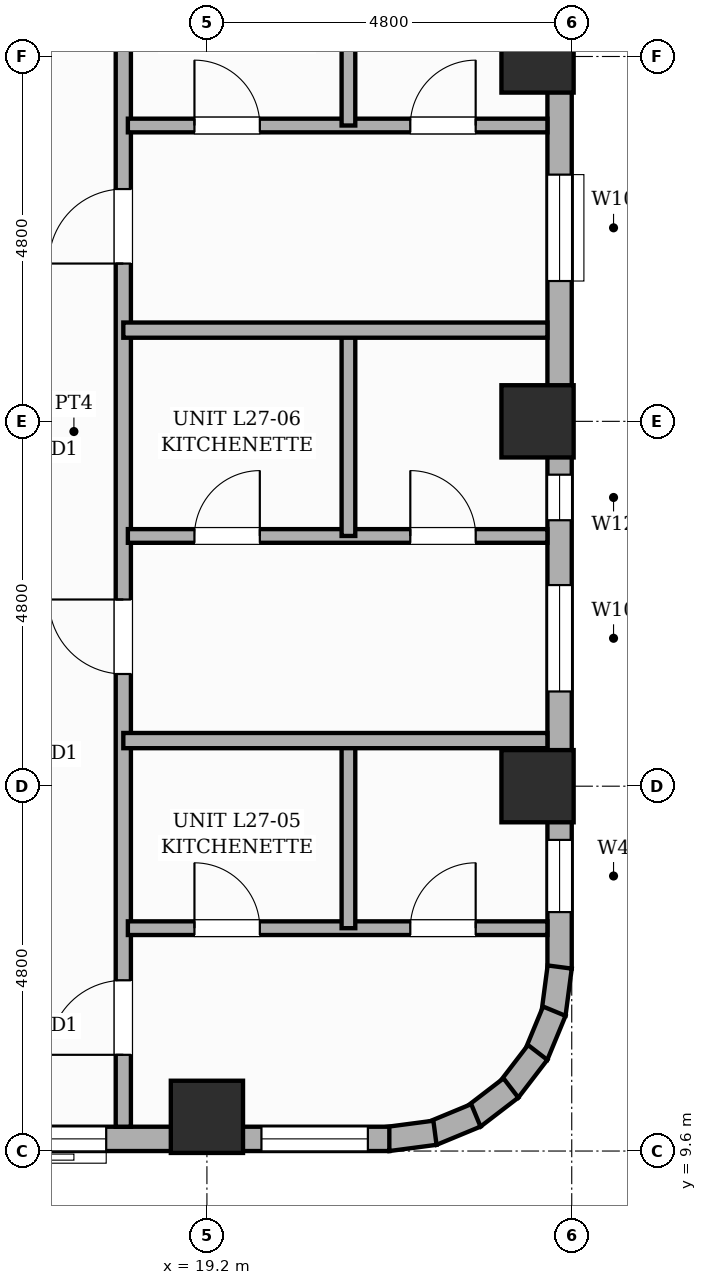
"""IFC4 building model, lengths in metres.
Left out: names, types, materials, properties, quantities, classifications, styles, units other than length and angle.
Written with IfcOpenShell. Run it as: python <this file> out.ifc"""

import sys

from ifc_helpers import new_model, si_unit, direction, frame, frame_2d, origin, origin_2d, place, context, subcontext, project, spatial, rectangle, extrude, element, fill, save


model = new_model("IFC4")
c1 = context("Model", 3, precision=1e-05, world=origin(), true_north=direction((0.0, 1.0)))
c2 = subcontext(c1, "Body", "Model", "MODEL_VIEW")
j1 = project(units=[si_unit("LENGTHUNIT", "METRE"), si_unit("PLANEANGLEUNIT", "RADIAN")], contexts=[c1])
p1 = place(None, origin())
s1 = spatial("IfcSite", under=j1, at=p1, CompositionType="ELEMENT")
p2 = place(p1, origin())
s2 = spatial("IfcBuilding", under=s1, at=p2, CompositionType="ELEMENT")
p3 = place(p2, frame((0.0, 0.0, 107.2)))
s3 = spatial("IfcBuildingStorey", under=s2, at=p3, CompositionType="ELEMENT", Elevation=107.2)
for number, where, z_axis, x_axis in (
    (1, (19.2, 10.05, 0.0), (0.0, 0.0, 1.0), (1.0, 0.0, 0.0)),
    (2, (23.55, 14.4, 0.0), (0.0, 0.0, 1.0), (1.0, 0.0, 0.0)),
    (3, (23.55, 19.2, 0.0), (0.0, 0.0, 1.0), (1.0, 0.0, 0.0)),
    (4, (23.55, 24.0, 0.0), (0.0, 0.0, 1.0), (1.0, 0.0, 0.0)),
):
    element("IfcColumn", number, at=place(p3, frame(where, z_axis=z_axis, x_axis=x_axis)), inside=s3, PredefinedType="COLUMN", context=c2, shape_type="SweptSolid", body=[
        extrude(rectangle(XDim=0.95, YDim=0.95, at=origin_2d()), origin(), (0.0, 0.0, 1.0), 3.6),
    ])
p4 = place(p3, frame((23.84, 26.4, 0.0), z_axis=(0.0, 0.0, 1.0), x_axis=(0.0, -1.0, 0.0)))
e5 = element("IfcWall", 5, at=p4, inside=s3, PredefinedType="STANDARD", context=c2, shape_type="SweptSolid", body=[
    extrude(rectangle(XDim=14.4, YDim=0.32, at=frame_2d((7.2, 0.0))), origin(), (0.0, 0.0, 1.0), 2.54),
])
p5 = place(p4, frame((9.354, 0.0, 0.65)))
e6 = element("IfcOpeningElement", 6, at=p5, cuts=e5, PredefinedType="OPENING", context=c2, shape_type="SweptSolid", body=[
    extrude(rectangle(XDim=1.4, YDim=1.1, at=frame_2d((0.7, 0.55))), frame((0.0, 0.17, 0.0), z_axis=(0.0, -1.0, 0.0), x_axis=(1.0, 0.0, 0.0)), (0.0, 0.0, 1.0), 0.34),
])
p6 = place(p4, frame((3.954, 0.0, 0.65)))
e7 = element("IfcOpeningElement", 7, at=p6, cuts=e5, PredefinedType="OPENING", context=c2, shape_type="SweptSolid", body=[
    extrude(rectangle(XDim=1.4, YDim=1.1, at=frame_2d((0.7, 0.55))), frame((0.0, 0.17, 0.0), z_axis=(0.0, -1.0, 0.0), x_axis=(1.0, 0.0, 0.0)), (0.0, 0.0, 1.0), 0.34),
])
p7 = place(p4, frame((12.707, 0.0, 0.45)))
e8 = element("IfcOpeningElement", 8, at=p7, cuts=e5, PredefinedType="OPENING", context=c2, shape_type="SweptSolid", body=[
    extrude(rectangle(XDim=0.95, YDim=1.8, at=frame_2d((0.475, 0.9))), frame((0.0, 0.17, 0.0), z_axis=(0.0, -1.0, 0.0), x_axis=(1.0, 0.0, 0.0)), (0.0, 0.0, 1.0), 0.34),
])
p8 = place(p4, frame((7.902, 0.0, 0.45)))
e9 = element("IfcOpeningElement", 9, at=p8, cuts=e5, PredefinedType="OPENING", context=c2, shape_type="SweptSolid", body=[
    extrude(rectangle(XDim=0.6, YDim=1.8, at=frame_2d((0.3, 0.9))), frame((0.0, 0.17, 0.0), z_axis=(0.0, -1.0, 0.0), x_axis=(1.0, 0.0, 0.0)), (0.0, 0.0, 1.0), 0.34),
])
p9 = place(p4, frame((0.917, 0.0, 0.45)))
e10 = element("IfcOpeningElement", 10, at=p9, cuts=e5, PredefinedType="OPENING", context=c2, shape_type="SweptSolid", body=[
    extrude(rectangle(XDim=0.75, YDim=1.8, at=frame_2d((0.375, 0.9))), frame((0.0, 0.17, 0.0), z_axis=(0.0, -1.0, 0.0), x_axis=(1.0, 0.0, 0.0)), (0.0, 0.0, 1.0), 0.34),
])
p10 = place(p3, frame((23.841, 12.021, 0.0), z_axis=(0.0, 0.0, 1.0), x_axis=(-0.130504898859, -0.991447664465, 0.0)))
e11 = element("IfcWall", 11, at=p10, inside=s3, PredefinedType="STANDARD", context=c2, shape_type="SweptSolid", body=[
    extrude(rectangle(XDim=0.627, YDim=0.32, at=frame_2d((0.313, 0.0))), origin(), (0.0, 0.0, 1.0), 3.36),
])
for number, where, z_axis, x_axis in (
    (12, (23.771, 11.44, 0.0), (0.0, 0.0, 1.0), (-0.383, -0.924, 0.0)),
    (13, (23.552, 10.897, 0.0), (0.0, 0.0, 1.0), (-0.609, -0.793, 0.0)),
    (14, (23.2, 10.43, 0.0), (0.0, 0.0, 1.0), (-0.793, -0.609, 0.0)),
    (15, (22.739, 10.069, 0.0), (0.0, 0.0, 1.0), (-0.924, -0.383, 0.0)),
    (16, (22.2, 9.84, 0.0), (0.0, 0.0, 1.0), (-0.991, -0.131, 0.0)),
):
    element("IfcWall", number, at=place(p3, frame(where, z_axis=z_axis, x_axis=x_axis)), inside=s3, PredefinedType="STANDARD", context=c2, shape_type="SweptSolid", body=[
        extrude(rectangle(XDim=0.626, YDim=0.32, at=frame_2d((0.313, 0.0))), origin(), (0.0, 0.0, 1.0), 3.36),
    ])
p11 = place(p3, frame((21.6, 9.76, 0.0), z_axis=(0.0, 0.0, 1.0), x_axis=(-1.0, 0.0, 0.0)))
e17 = element("IfcWall", 17, at=p11, inside=s3, PredefinedType="STANDARD", context=c2, shape_type="SweptSolid", body=[
    extrude(rectangle(XDim=14.4, YDim=0.32, at=frame_2d((7.2, 0.0))), origin(), (0.0, 0.0, 1.0), 2.54),
])
p12 = place(p11, frame((5.653, 0.0, 0.45)))
e18 = element("IfcOpeningElement", 18, at=p12, cuts=e17, PredefinedType="OPENING", context=c2, shape_type="SweptSolid", body=[
    extrude(rectangle(XDim=0.75, YDim=1.8, at=frame_2d((0.375, 0.9))), frame((0.0, 0.17, 0.0), z_axis=(0.0, -1.0, 0.0), x_axis=(1.0, 0.0, 0.0)), (0.0, 0.0, 1.0), 0.34),
])
p13 = place(p11, frame((0.282, 0.0, 0.65)))
e19 = element("IfcOpeningElement", 19, at=p13, cuts=e17, PredefinedType="OPENING", context=c2, shape_type="SweptSolid", body=[
    extrude(rectangle(XDim=1.4, YDim=1.1, at=frame_2d((0.7, 0.55))), frame((0.0, 0.17, 0.0), z_axis=(0.0, -1.0, 0.0), x_axis=(1.0, 0.0, 0.0)), (0.0, 0.0, 1.0), 0.34),
])
p14 = place(p11, frame((3.725, 0.0, 0.65)))
e20 = element("IfcOpeningElement", 20, at=p14, cuts=e17, PredefinedType="OPENING", context=c2, shape_type="SweptSolid", body=[
    extrude(rectangle(XDim=1.4, YDim=1.1, at=frame_2d((0.7, 0.55))), frame((0.0, 0.17, 0.0), z_axis=(0.0, -1.0, 0.0), x_axis=(1.0, 0.0, 0.0)), (0.0, 0.0, 1.0), 0.34),
])
p15 = place(p3, frame((18.1, 9.92, 0.0), z_axis=(0.0, 0.0, 1.0), x_axis=(0.0, 1.0, 0.0)))
e21 = element("IfcWall", 21, at=p15, inside=s3, PredefinedType="PARTITIONING", context=c2, shape_type="SweptSolid", body=[
    extrude(rectangle(XDim=15.83, YDim=0.2, at=frame_2d((7.915, 0.0))), origin(), (0.0, 0.0, 1.0), 3.36),
])
p16 = place(p15, frame((0.946, 0.0, 0.0)))
e22 = element("IfcOpeningElement", 22, at=p16, cuts=e21, PredefinedType="OPENING", context=c2, shape_type="SweptSolid", body=[
    extrude(rectangle(XDim=0.98, YDim=2.18, at=frame_2d((0.49, 1.09))), frame((0.0, 0.11, 0.0), z_axis=(0.0, -1.0, 0.0), x_axis=(1.0, 0.0, 0.0)), (0.0, 0.0, 1.0), 0.22),
])
p17 = place(p15, frame((5.956, 0.0, 0.0)))
e23 = element("IfcOpeningElement", 23, at=p17, cuts=e21, PredefinedType="OPENING", context=c2, shape_type="SweptSolid", body=[
    extrude(rectangle(XDim=0.98, YDim=2.18, at=frame_2d((0.49, 1.09))), frame((0.0, 0.11, 0.0), z_axis=(0.0, -1.0, 0.0), x_axis=(1.0, 0.0, 0.0)), (0.0, 0.0, 1.0), 0.22),
])
p18 = place(p15, frame((11.356, 0.0, 0.0)))
e24 = element("IfcOpeningElement", 24, at=p18, cuts=e21, PredefinedType="OPENING", context=c2, shape_type="SweptSolid", body=[
    extrude(rectangle(XDim=0.98, YDim=2.18, at=frame_2d((0.49, 1.09))), frame((0.0, 0.11, 0.0), z_axis=(0.0, -1.0, 0.0), x_axis=(1.0, 0.0, 0.0)), (0.0, 0.0, 1.0), 0.22),
])
p19 = place(p3, frame((18.16, 12.532, 0.0), z_axis=(0.0, 0.0, 1.0), x_axis=(1.0, 0.0, 0.0)))
e25 = element("IfcWall", 25, at=p19, inside=s3, PredefinedType="PLUMBINGWALL", context=c2, shape_type="SweptSolid", body=[
    extrude(rectangle(XDim=5.52, YDim=0.18, at=frame_2d((2.76, 0.0))), origin(), (0.0, 0.0, 1.0), 3.36),
])
p20 = place(p19, frame((0.876, 0.0, 0.0)))
e26 = element("IfcOpeningElement", 26, at=p20, cuts=e25, PredefinedType="OPENING", context=c2, shape_type="SweptSolid", body=[
    extrude(rectangle(XDim=0.86, YDim=2.1, at=frame_2d((0.43, 1.05))), frame((0.0, 0.1, 0.0), z_axis=(0.0, -1.0, 0.0), x_axis=(1.0, 0.0, 0.0)), (0.0, 0.0, 1.0), 0.2),
])
p21 = place(p19, frame((3.716, 0.0, 0.0)))
e27 = element("IfcOpeningElement", 27, at=p21, cuts=e25, PredefinedType="OPENING", context=c2, shape_type="SweptSolid", body=[
    extrude(rectangle(XDim=0.86, YDim=2.1, at=frame_2d((0.43, 1.05))), frame((0.0, 0.1, 0.0), z_axis=(0.0, -1.0, 0.0), x_axis=(1.0, 0.0, 0.0)), (0.0, 0.0, 1.0), 0.2),
])
p22 = place(p3, frame((21.062, 12.532, 0.0), z_axis=(0.0, 0.0, 1.0), x_axis=(0.0, 1.0, 0.0)))
e28 = element("IfcWall", 28, at=p22, inside=s3, PredefinedType="PLUMBINGWALL", context=c2, shape_type="SweptSolid", body=[
    extrude(rectangle(XDim=2.508, YDim=0.18, at=frame_2d((1.254, 0.0))), origin(), (0.0, 0.0, 1.0), 3.36),
])
p23 = place(p3, frame((18.1, 15.0, 0.0), z_axis=(0.0, 0.0, 1.0), x_axis=(1.0, 0.0, 0.0)))
e29 = element("IfcWall", 29, at=p23, inside=s3, PredefinedType="SOLIDWALL", context=c2, shape_type="SweptSolid", body=[
    extrude(rectangle(XDim=5.58, YDim=0.2, at=frame_2d((2.79, 0.0))), origin(), (0.0, 0.0, 1.0), 3.36),
])
p24 = place(p3, frame((18.16, 17.692, 0.0), z_axis=(0.0, 0.0, 1.0), x_axis=(1.0, 0.0, 0.0)))
e30 = element("IfcWall", 30, at=p24, inside=s3, PredefinedType="PLUMBINGWALL", context=c2, shape_type="SweptSolid", body=[
    extrude(rectangle(XDim=5.52, YDim=0.18, at=frame_2d((2.76, 0.0))), origin(), (0.0, 0.0, 1.0), 3.36),
])
p25 = place(p24, frame((0.876, 0.0, 0.0)))
e31 = element("IfcOpeningElement", 31, at=p25, cuts=e30, PredefinedType="OPENING", context=c2, shape_type="SweptSolid", body=[
    extrude(rectangle(XDim=0.86, YDim=2.1, at=frame_2d((0.43, 1.05))), frame((0.0, 0.1, 0.0), z_axis=(0.0, -1.0, 0.0), x_axis=(1.0, 0.0, 0.0)), (0.0, 0.0, 1.0), 0.2),
])
p26 = place(p24, frame((3.716, 0.0, 0.0)))
e32 = element("IfcOpeningElement", 32, at=p26, cuts=e30, PredefinedType="OPENING", context=c2, shape_type="SweptSolid", body=[
    extrude(rectangle(XDim=0.86, YDim=2.1, at=frame_2d((0.43, 1.05))), frame((0.0, 0.1, 0.0), z_axis=(0.0, -1.0, 0.0), x_axis=(1.0, 0.0, 0.0)), (0.0, 0.0, 1.0), 0.2),
])
p27 = place(p3, frame((21.062, 17.692, 0.0), z_axis=(0.0, 0.0, 1.0), x_axis=(0.0, 1.0, 0.0)))
e33 = element("IfcWall", 33, at=p27, inside=s3, PredefinedType="PLUMBINGWALL", context=c2, shape_type="SweptSolid", body=[
    extrude(rectangle(XDim=2.748, YDim=0.18, at=frame_2d((1.374, 0.0))), origin(), (0.0, 0.0, 1.0), 3.36),
])
p28 = place(p3, frame((18.1, 20.4, 0.0), z_axis=(0.0, 0.0, 1.0), x_axis=(1.0, 0.0, 0.0)))
e34 = element("IfcWall", 34, at=p28, inside=s3, PredefinedType="SOLIDWALL", context=c2, shape_type="SweptSolid", body=[
    extrude(rectangle(XDim=5.58, YDim=0.2, at=frame_2d((2.79, 0.0))), origin(), (0.0, 0.0, 1.0), 3.36),
])
p29 = place(p3, frame((18.16, 23.092, 0.0), z_axis=(0.0, 0.0, 1.0), x_axis=(1.0, 0.0, 0.0)))
e35 = element("IfcWall", 35, at=p29, inside=s3, PredefinedType="PLUMBINGWALL", context=c2, shape_type="SweptSolid", body=[
    extrude(rectangle(XDim=5.52, YDim=0.18, at=frame_2d((2.76, 0.0))), origin(), (0.0, 0.0, 1.0), 3.36),
])
p30 = place(p29, frame((0.876, 0.0, 0.0)))
e36 = element("IfcOpeningElement", 36, at=p30, cuts=e35, PredefinedType="OPENING", context=c2, shape_type="SweptSolid", body=[
    extrude(rectangle(XDim=0.86, YDim=2.1, at=frame_2d((0.43, 1.05))), frame((0.0, 0.1, 0.0), z_axis=(0.0, -1.0, 0.0), x_axis=(1.0, 0.0, 0.0)), (0.0, 0.0, 1.0), 0.2),
])
p31 = place(p29, frame((3.716, 0.0, 0.0)))
e37 = element("IfcOpeningElement", 37, at=p31, cuts=e35, PredefinedType="OPENING", context=c2, shape_type="SweptSolid", body=[
    extrude(rectangle(XDim=0.86, YDim=2.1, at=frame_2d((0.43, 1.05))), frame((0.0, 0.1, 0.0), z_axis=(0.0, -1.0, 0.0), x_axis=(1.0, 0.0, 0.0)), (0.0, 0.0, 1.0), 0.2),
])
p32 = place(p3, frame((21.062, 23.092, 0.0), z_axis=(0.0, 0.0, 1.0), x_axis=(0.0, 1.0, 0.0)))
e38 = element("IfcWall", 38, at=p32, inside=s3, PredefinedType="PLUMBINGWALL", context=c2, shape_type="SweptSolid", body=[
    extrude(rectangle(XDim=2.628, YDim=0.18, at=frame_2d((1.314, 0.0))), origin(), (0.0, 0.0, 1.0), 3.36),
])
p33 = place(p5, origin())
e39 = element("IfcWindow", 39, at=p33, inside=s3, PartitioningType="SINGLE_PANEL", PredefinedType="WINDOW", context=c2, shape_type="SweptSolid", body=[
    extrude(rectangle(XDim=1.4, YDim=1.1, at=frame_2d((0.7, 0.55))), frame((0.0, 0.03, 0.0), z_axis=(0.0, -1.0, 0.0), x_axis=(1.0, 0.0, 0.0)), (0.0, 0.0, 1.0), 0.06),
])
fill(e6, e39)
p34 = place(p6, origin())
e40 = element("IfcWindow", 40, at=p34, inside=s3, PartitioningType="SINGLE_PANEL", PredefinedType="WINDOW", context=c2, shape_type="SweptSolid", body=[
    extrude(rectangle(XDim=1.4, YDim=1.1, at=frame_2d((0.7, 0.55))), frame((0.0, 0.03, 0.0), z_axis=(0.0, -1.0, 0.0), x_axis=(1.0, 0.0, 0.0)), (0.0, 0.0, 1.0), 0.06),
])
fill(e7, e40)
p35 = place(p7, origin())
e41 = element("IfcWindow", 41, at=p35, inside=s3, PartitioningType="SINGLE_PANEL", PredefinedType="WINDOW", context=c2, shape_type="SweptSolid", body=[
    extrude(rectangle(XDim=0.95, YDim=1.8, at=frame_2d((0.475, 0.9))), frame((0.0, 0.03, 0.0), z_axis=(0.0, -1.0, 0.0), x_axis=(1.0, 0.0, 0.0)), (0.0, 0.0, 1.0), 0.06),
])
fill(e8, e41)
p36 = place(p8, origin())
e42 = element("IfcWindow", 42, at=p36, inside=s3, PartitioningType="SINGLE_PANEL", PredefinedType="WINDOW", context=c2, shape_type="SweptSolid", body=[
    extrude(rectangle(XDim=0.6, YDim=1.8, at=frame_2d((0.3, 0.9))), frame((0.0, 0.03, 0.0), z_axis=(0.0, -1.0, 0.0), x_axis=(1.0, 0.0, 0.0)), (0.0, 0.0, 1.0), 0.06),
])
fill(e9, e42)
p37 = place(p13, origin())
e43 = element("IfcWindow", 43, at=p37, inside=s3, PartitioningType="SINGLE_PANEL", PredefinedType="WINDOW", context=c2, shape_type="SweptSolid", body=[
    extrude(rectangle(XDim=1.4, YDim=1.1, at=frame_2d((0.7, 0.55))), frame((0.0, 0.03, 0.0), z_axis=(0.0, -1.0, 0.0), x_axis=(1.0, 0.0, 0.0)), (0.0, 0.0, 1.0), 0.06),
])
fill(e19, e43)
p38 = place(p14, origin())
e44 = element("IfcWindow", 44, at=p38, inside=s3, PartitioningType="SINGLE_PANEL", PredefinedType="WINDOW", context=c2, shape_type="SweptSolid", body=[
    extrude(rectangle(XDim=1.4, YDim=1.1, at=frame_2d((0.7, 0.55))), frame((0.0, 0.03, 0.0), z_axis=(0.0, -1.0, 0.0), x_axis=(1.0, 0.0, 0.0)), (0.0, 0.0, 1.0), 0.06),
])
fill(e20, e44)
p39 = place(p16, origin())
e45 = element("IfcDoor", 45, at=p39, inside=s3, OperationType="SINGLE_SWING_LEFT", PredefinedType="DOOR", context=c2, shape_type="SweptSolid", body=[
    extrude(rectangle(XDim=0.98, YDim=2.18, at=frame_2d((0.49, 1.09))), frame((0.0, 0.025, 0.0), z_axis=(0.0, -1.0, 0.0), x_axis=(1.0, 0.0, 0.0)), (0.0, 0.0, 1.0), 0.05),
])
fill(e22, e45)
p40 = place(p20, origin())
e46 = element("IfcDoor", 46, at=p40, inside=s3, OperationType="SINGLE_SWING_LEFT", PredefinedType="DOOR", context=c2, shape_type="SweptSolid", body=[
    extrude(rectangle(XDim=0.86, YDim=2.1, at=frame_2d((0.43, 1.05))), frame((0.0, 0.025, 0.0), z_axis=(0.0, -1.0, 0.0), x_axis=(1.0, 0.0, 0.0)), (0.0, 0.0, 1.0), 0.05),
])
fill(e26, e46)
p41 = place(p21, origin())
e47 = element("IfcDoor", 47, at=p41, inside=s3, OperationType="SINGLE_SWING_RIGHT", PredefinedType="DOOR", context=c2, shape_type="SweptSolid", body=[
    extrude(rectangle(XDim=0.86, YDim=2.1, at=frame_2d((0.43, 1.05))), frame((0.0, 0.025, 0.0), z_axis=(0.0, -1.0, 0.0), x_axis=(1.0, 0.0, 0.0)), (0.0, 0.0, 1.0), 0.05),
])
fill(e27, e47)
p42 = place(p17, origin())
e48 = element("IfcDoor", 48, at=p42, inside=s3, OperationType="SINGLE_SWING_RIGHT", PredefinedType="DOOR", context=c2, shape_type="SweptSolid", body=[
    extrude(rectangle(XDim=0.98, YDim=2.18, at=frame_2d((0.49, 1.09))), frame((0.0, 0.025, 0.0), z_axis=(0.0, -1.0, 0.0), x_axis=(1.0, 0.0, 0.0)), (0.0, 0.0, 1.0), 0.05),
])
fill(e23, e48)
p43 = place(p25, origin())
e49 = element("IfcDoor", 49, at=p43, inside=s3, OperationType="SINGLE_SWING_RIGHT", PredefinedType="DOOR", context=c2, shape_type="SweptSolid", body=[
    extrude(rectangle(XDim=0.86, YDim=2.1, at=frame_2d((0.43, 1.05))), frame((0.0, 0.025, 0.0), z_axis=(0.0, -1.0, 0.0), x_axis=(1.0, 0.0, 0.0)), (0.0, 0.0, 1.0), 0.05),
])
fill(e31, e49)
p44 = place(p26, origin())
e50 = element("IfcDoor", 50, at=p44, inside=s3, OperationType="SINGLE_SWING_LEFT", PredefinedType="DOOR", context=c2, shape_type="SweptSolid", body=[
    extrude(rectangle(XDim=0.86, YDim=2.1, at=frame_2d((0.43, 1.05))), frame((0.0, 0.025, 0.0), z_axis=(0.0, -1.0, 0.0), x_axis=(1.0, 0.0, 0.0)), (0.0, 0.0, 1.0), 0.05),
])
fill(e32, e50)
p45 = place(p18, origin())
e51 = element("IfcDoor", 51, at=p45, inside=s3, OperationType="SINGLE_SWING_LEFT", PredefinedType="DOOR", context=c2, shape_type="SweptSolid", body=[
    extrude(rectangle(XDim=0.98, YDim=2.18, at=frame_2d((0.49, 1.09))), frame((0.0, 0.025, 0.0), z_axis=(0.0, -1.0, 0.0), x_axis=(1.0, 0.0, 0.0)), (0.0, 0.0, 1.0), 0.05),
])
fill(e24, e51)
p46 = place(p30, origin())
e52 = element("IfcDoor", 52, at=p46, inside=s3, OperationType="SINGLE_SWING_LEFT", PredefinedType="DOOR", context=c2, shape_type="SweptSolid", body=[
    extrude(rectangle(XDim=0.86, YDim=2.1, at=frame_2d((0.43, 1.05))), frame((0.0, 0.025, 0.0), z_axis=(0.0, -1.0, 0.0), x_axis=(1.0, 0.0, 0.0)), (0.0, 0.0, 1.0), 0.05),
])
fill(e36, e52)
p47 = place(p31, origin())
e53 = element("IfcDoor", 53, at=p47, inside=s3, OperationType="SINGLE_SWING_RIGHT", PredefinedType="DOOR", context=c2, shape_type="SweptSolid", body=[
    extrude(rectangle(XDim=0.86, YDim=2.1, at=frame_2d((0.43, 1.05))), frame((0.0, 0.025, 0.0), z_axis=(0.0, -1.0, 0.0), x_axis=(1.0, 0.0, 0.0)), (0.0, 0.0, 1.0), 0.05),
])
fill(e37, e53)
save(model, sys.argv[1])
